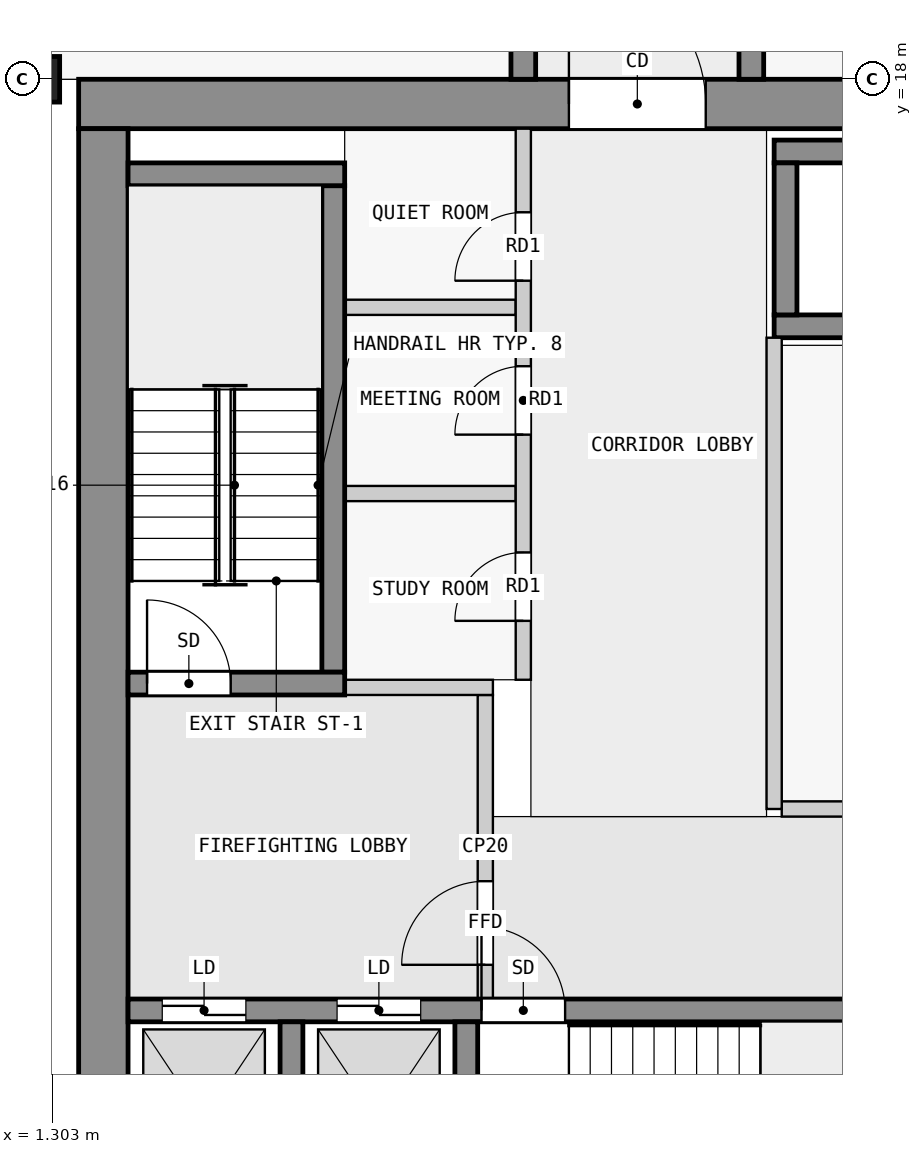
"""IFC4 building model, lengths in metres.
Left out: names, types, materials, properties, quantities, classifications, styles, units other than length and angle.
Written with IfcOpenShell. Run it as: python <this file> out.ifc"""

import sys

from ifc_helpers import new_model, si_unit, direction, frame, frame_2d, origin, origin_2d, place, context, subcontext, project, spatial, rectangle, extrude, element, fill, save


model = new_model("IFC4")
c1 = context("Model", 3, precision=1e-05, world=origin(), true_north=direction((0.0, 1.0)))
c2 = subcontext(c1, "Body", "Model", "MODEL_VIEW")
j1 = project(units=[si_unit("LENGTHUNIT", "METRE"), si_unit("PLANEANGLEUNIT", "RADIAN")], contexts=[c1])
p1 = place(None, origin())
s1 = spatial("IfcSite", under=j1, at=p1, CompositionType="ELEMENT")
p2 = place(p1, origin())
s2 = spatial("IfcBuilding", under=s1, at=p2, CompositionType="ELEMENT")
p3 = place(p2, frame((0.0, 0.0, 106.3)))
s3 = spatial("IfcBuildingStorey", under=s2, at=p3, CompositionType="ELEMENT", Elevation=106.3)
p4 = place(p3, frame((0.7, 18.0, 0.0), z_axis=(0.0, 0.0, 1.0), x_axis=(0.0, 1.0, 0.0)))
e1 = element("IfcColumn", 1, at=p4, inside=s3, PredefinedType="COLUMN", context=c2, shape_type="SweptSolid", body=[
    extrude(rectangle(XDim=0.6, YDim=1.4, at=origin_2d()), origin(), (0.0, 0.0, 1.0), 3.5),
])
p5 = place(p3, frame((1.65, 17.675, 0.0), z_axis=(0.0, 0.0, 1.0), x_axis=(1.0, 0.0, 0.0)))
e2 = element("IfcWall", 2, at=p5, inside=s3, PredefinedType="SHEAR", context=c2, shape_type="SweptSolid", body=[
    extrude(rectangle(XDim=20.85, YDim=0.65, at=frame_2d((10.425, 0.0))), origin(), (0.0, 0.0, 1.0), 3.25),
])
p6 = place(p5, frame((6.45, 0.0, 0.0)))
e3 = element("IfcOpeningElement", 3, at=p6, cuts=e2, PredefinedType="OPENING", context=c2, shape_type="SweptSolid", body=[
    extrude(rectangle(XDim=1.8, YDim=2.1, at=frame_2d((0.9, 1.05))), frame((0.0, 0.335, 0.0), z_axis=(0.0, -1.0, 0.0), x_axis=(1.0, 0.0, 0.0)), (0.0, 0.0, 1.0), 0.67),
])
p7 = place(p3, frame((1.975, 2.5, 0.0), z_axis=(0.0, 0.0, 1.0), x_axis=(0.0, 1.0, 0.0)))
e4 = element("IfcWall", 4, at=p7, inside=s3, PredefinedType="SHEAR", context=c2, shape_type="SweptSolid", body=[
    extrude(rectangle(XDim=14.85, YDim=0.65, at=frame_2d((7.425, 0.0))), origin(), (0.0, 0.0, 1.0), 3.25),
])
for number, where, z_axis, x_axis in (
    (5, (4.45, 2.8, 0.0), (0.0, 0.0, 1.0), (0.0, 1.0, 0.0)),
    (6, (6.75, 2.8, 0.0), (0.0, 0.0, 1.0), (0.0, 1.0, 0.0)),
):
    element("IfcWall", number, at=place(p3, frame(where, z_axis=z_axis, x_axis=x_axis)), inside=s3, PredefinedType="SHEAR", context=c2, shape_type="SweptSolid", body=[
        extrude(rectangle(XDim=2.8, YDim=0.3, at=frame_2d((1.4, 0.0))), origin(), (0.0, 0.0, 1.0), 3.25),
    ])
p8 = place(p3, frame((2.3, 5.75, 0.0), z_axis=(0.0, 0.0, 1.0), x_axis=(1.0, 0.0, 0.0)))
e7 = element("IfcWall", 7, at=p8, inside=s3, PredefinedType="SHEAR", context=c2, shape_type="SweptSolid", body=[
    extrude(rectangle(XDim=18.8, YDim=0.3, at=frame_2d((9.4, 0.0))), origin(), (0.0, 0.0, 1.0), 3.25),
])
p9 = place(p8, frame((4.65, 0.0, 0.0)))
e8 = element("IfcOpeningElement", 8, at=p9, cuts=e7, PredefinedType="OPENING", context=c2, shape_type="SweptSolid", body=[
    extrude(rectangle(XDim=1.1, YDim=2.1, at=frame_2d((0.55, 1.05))), frame((0.0, 0.16, 0.0), z_axis=(0.0, -1.0, 0.0), x_axis=(1.0, 0.0, 0.0)), (0.0, 0.0, 1.0), 0.32),
])
p10 = place(p8, frame((0.45, 0.0, 0.0)))
e9 = element("IfcOpeningElement", 9, at=p10, cuts=e7, PredefinedType="OPENING", context=c2, shape_type="SweptSolid", body=[
    extrude(rectangle(XDim=1.1, YDim=2.1, at=frame_2d((0.55, 1.05))), frame((0.0, 0.16, 0.0), z_axis=(0.0, -1.0, 0.0), x_axis=(1.0, 0.0, 0.0)), (0.0, 0.0, 1.0), 0.32),
])
p11 = place(p8, frame((2.75, 0.0, 0.0)))
e10 = element("IfcOpeningElement", 10, at=p11, cuts=e7, PredefinedType="OPENING", context=c2, shape_type="SweptSolid", body=[
    extrude(rectangle(XDim=1.1, YDim=2.1, at=frame_2d((0.55, 1.05))), frame((0.0, 0.16, 0.0), z_axis=(0.0, -1.0, 0.0), x_axis=(1.0, 0.0, 0.0)), (0.0, 0.0, 1.0), 0.32),
])
p12 = place(p8, frame((11.85, 0.0, 0.0)))
e11 = element("IfcOpeningElement", 11, at=p12, cuts=e7, PredefinedType="OPENING", context=c2, shape_type="SweptSolid", body=[
    extrude(rectangle(XDim=1.1, YDim=2.1, at=frame_2d((0.55, 1.05))), frame((0.0, 0.16, 0.0), z_axis=(0.0, -1.0, 0.0), x_axis=(1.0, 0.0, 0.0)), (0.0, 0.0, 1.0), 0.32),
])
p13 = place(p8, frame((14.35, 0.0, 0.0)))
e12 = element("IfcOpeningElement", 12, at=p13, cuts=e7, PredefinedType="OPENING", context=c2, shape_type="SweptSolid", body=[
    extrude(rectangle(XDim=1.1, YDim=2.1, at=frame_2d((0.55, 1.05))), frame((0.0, 0.16, 0.0), z_axis=(0.0, -1.0, 0.0), x_axis=(1.0, 0.0, 0.0)), (0.0, 0.0, 1.0), 0.32),
])
p14 = place(p8, frame((16.85, 0.0, 0.0)))
e13 = element("IfcOpeningElement", 13, at=p14, cuts=e7, PredefinedType="OPENING", context=c2, shape_type="SweptSolid", body=[
    extrude(rectangle(XDim=1.1, YDim=2.1, at=frame_2d((0.55, 1.05))), frame((0.0, 0.16, 0.0), z_axis=(0.0, -1.0, 0.0), x_axis=(1.0, 0.0, 0.0)), (0.0, 0.0, 1.0), 0.32),
])
p15 = place(p3, frame((2.3, 10.05, 0.0), z_axis=(0.0, 0.0, 1.0), x_axis=(1.0, 0.0, 0.0)))
e14 = element("IfcWall", 14, at=p15, inside=s3, PredefinedType="SHEAR", context=c2, shape_type="SweptSolid", body=[
    extrude(rectangle(XDim=2.85, YDim=0.3, at=frame_2d((1.425, 0.0))), origin(), (0.0, 0.0, 1.0), 3.25),
])
p16 = place(p15, frame((0.25, 0.0, 0.0)))
e15 = element("IfcOpeningElement", 15, at=p16, cuts=e14, PredefinedType="OPENING", context=c2, shape_type="SweptSolid", body=[
    extrude(rectangle(XDim=1.1, YDim=2.1, at=frame_2d((0.55, 1.05))), frame((0.0, 0.16, 0.0), z_axis=(0.0, -1.0, 0.0), x_axis=(1.0, 0.0, 0.0)), (0.0, 0.0, 1.0), 0.32),
])
p17 = place(p3, frame((5.0, 10.2, 0.0), z_axis=(0.0, 0.0, 1.0), x_axis=(0.0, 1.0, 0.0)))
e16 = element("IfcWall", 16, at=p17, inside=s3, PredefinedType="SHEAR", context=c2, shape_type="SweptSolid", body=[
    extrude(rectangle(XDim=6.4, YDim=0.3, at=frame_2d((3.2, 0.0))), origin(), (0.0, 0.0, 1.0), 3.25),
])
p18 = place(p3, frame((2.3, 16.75, 0.0), z_axis=(0.0, 0.0, 1.0), x_axis=(1.0, 0.0, 0.0)))
e17 = element("IfcWall", 17, at=p18, inside=s3, PredefinedType="SHEAR", context=c2, shape_type="SweptSolid", body=[
    extrude(rectangle(XDim=2.85, YDim=0.3, at=frame_2d((1.425, 0.0))), origin(), (0.0, 0.0, 1.0), 3.25),
])
for number, where, z_axis, x_axis in (
    (18, (10.8, 17.05, 0.0), (0.0, 0.0, 1.0), (1.0, 0.0, 0.0)),
    (19, (10.8, 14.75, 0.0), (0.0, 0.0, 1.0), (1.0, 0.0, 0.0)),
):
    element("IfcWall", number, at=place(p3, frame(where, z_axis=z_axis, x_axis=x_axis)), inside=s3, PredefinedType="SHEAR", context=c2, shape_type="SweptSolid", body=[
        extrude(rectangle(XDim=7.8, YDim=0.3, at=frame_2d((3.9, 0.0))), origin(), (0.0, 0.0, 1.0), 3.25),
    ])
p19 = place(p3, frame((10.95, 14.9, 0.0), z_axis=(0.0, 0.0, 1.0), x_axis=(0.0, 1.0, 0.0)))
e20 = element("IfcWall", 20, at=p19, inside=s3, PredefinedType="SHEAR", context=c2, shape_type="SweptSolid", body=[
    extrude(rectangle(XDim=2.0, YDim=0.3, at=frame_2d((1.0, 0.0))), origin(), (0.0, 0.0, 1.0), 3.25),
])
p20 = place(p3, frame((7.5, 18.0, 0.0), z_axis=(0.0, 0.0, 1.0), x_axis=(0.0, 1.0, 0.0)))
e21 = element("IfcWall", 21, at=p20, inside=s3, PredefinedType="SHEAR", context=c2, shape_type="SweptSolid", body=[
    extrude(rectangle(XDim=27.0, YDim=0.325, at=frame_2d((13.5, 0.0))), origin(), (0.0, 0.0, 1.0), 3.25),
])
p21 = place(p20, frame((1.75, 0.0, 0.0)))
e22 = element("IfcOpeningElement", 22, at=p21, cuts=e21, PredefinedType="OPENING", context=c2, shape_type="SweptSolid", body=[
    extrude(rectangle(XDim=1.0, YDim=2.1, at=frame_2d((0.5, 1.05))), frame((0.0, 0.172, 0.0), z_axis=(0.0, -1.0, 0.0), x_axis=(1.0, 0.0, 0.0)), (0.0, 0.0, 1.0), 0.345),
])
p22 = place(p20, frame((6.25, 0.0, 0.0)))
e23 = element("IfcOpeningElement", 23, at=p22, cuts=e21, PredefinedType="OPENING", context=c2, shape_type="SweptSolid", body=[
    extrude(rectangle(XDim=1.0, YDim=2.1, at=frame_2d((0.5, 1.05))), frame((0.0, 0.172, 0.0), z_axis=(0.0, -1.0, 0.0), x_axis=(1.0, 0.0, 0.0)), (0.0, 0.0, 1.0), 0.345),
])
p23 = place(p20, frame((10.75, 0.0, 0.0)))
e24 = element("IfcOpeningElement", 24, at=p23, cuts=e21, PredefinedType="OPENING", context=c2, shape_type="SweptSolid", body=[
    extrude(rectangle(XDim=1.0, YDim=2.1, at=frame_2d((0.5, 1.05))), frame((0.0, 0.172, 0.0), z_axis=(0.0, -1.0, 0.0), x_axis=(1.0, 0.0, 0.0)), (0.0, 0.0, 1.0), 0.345),
])
p24 = place(p20, frame((15.25, 0.0, 0.0)))
e25 = element("IfcOpeningElement", 25, at=p24, cuts=e21, PredefinedType="OPENING", context=c2, shape_type="SweptSolid", body=[
    extrude(rectangle(XDim=1.0, YDim=2.1, at=frame_2d((0.5, 1.05))), frame((0.0, 0.172, 0.0), z_axis=(0.0, -1.0, 0.0), x_axis=(1.0, 0.0, 0.0)), (0.0, 0.0, 1.0), 0.345),
])
p25 = place(p20, frame((19.75, 0.0, 0.0)))
e26 = element("IfcOpeningElement", 26, at=p25, cuts=e21, PredefinedType="OPENING", context=c2, shape_type="SweptSolid", body=[
    extrude(rectangle(XDim=1.0, YDim=2.1, at=frame_2d((0.5, 1.05))), frame((0.0, 0.172, 0.0), z_axis=(0.0, -1.0, 0.0), x_axis=(1.0, 0.0, 0.0)), (0.0, 0.0, 1.0), 0.345),
])
p26 = place(p20, frame((23.25, 0.0, 0.0)))
e27 = element("IfcOpeningElement", 27, at=p26, cuts=e21, PredefinedType="OPENING", context=c2, shape_type="SweptSolid", body=[
    extrude(rectangle(XDim=0.9, YDim=2.1, at=frame_2d((0.45, 1.05))), frame((0.0, 0.172, 0.0), z_axis=(0.0, -1.0, 0.0), x_axis=(1.0, 0.0, 0.0)), (0.0, 0.0, 1.0), 0.345),
])
p27 = place(p20, frame((25.45, 0.0, 0.0)))
e28 = element("IfcOpeningElement", 28, at=p27, cuts=e21, PredefinedType="OPENING", context=c2, shape_type="SweptSolid", body=[
    extrude(rectangle(XDim=1.0, YDim=2.1, at=frame_2d((0.5, 1.05))), frame((0.0, 0.172, 0.0), z_axis=(0.0, -1.0, 0.0), x_axis=(1.0, 0.0, 0.0)), (0.0, 0.0, 1.0), 0.345),
])
p28 = place(p3, frame((10.5, 18.0, 0.0), z_axis=(0.0, 0.0, 1.0), x_axis=(0.0, 1.0, 0.0)))
e29 = element("IfcWall", 29, at=p28, inside=s3, PredefinedType="SHEAR", context=c2, shape_type="SweptSolid", body=[
    extrude(rectangle(XDim=27.0, YDim=0.325, at=frame_2d((13.5, 0.0))), origin(), (0.0, 0.0, 1.0), 3.25),
])
p29 = place(p28, frame((1.75, 0.0, 0.0)))
e30 = element("IfcOpeningElement", 30, at=p29, cuts=e29, PredefinedType="OPENING", context=c2, shape_type="SweptSolid", body=[
    extrude(rectangle(XDim=1.0, YDim=2.1, at=frame_2d((0.5, 1.05))), frame((0.0, 0.172, 0.0), z_axis=(0.0, -1.0, 0.0), x_axis=(1.0, 0.0, 0.0)), (0.0, 0.0, 1.0), 0.345),
])
p30 = place(p28, frame((6.25, 0.0, 0.0)))
e31 = element("IfcOpeningElement", 31, at=p30, cuts=e29, PredefinedType="OPENING", context=c2, shape_type="SweptSolid", body=[
    extrude(rectangle(XDim=1.0, YDim=2.1, at=frame_2d((0.5, 1.05))), frame((0.0, 0.172, 0.0), z_axis=(0.0, -1.0, 0.0), x_axis=(1.0, 0.0, 0.0)), (0.0, 0.0, 1.0), 0.345),
])
p31 = place(p28, frame((13.05, 0.0, 0.0)))
e32 = element("IfcOpeningElement", 32, at=p31, cuts=e29, PredefinedType="OPENING", context=c2, shape_type="SweptSolid", body=[
    extrude(rectangle(XDim=1.0, YDim=2.1, at=frame_2d((0.5, 1.05))), frame((0.0, 0.172, 0.0), z_axis=(0.0, -1.0, 0.0), x_axis=(1.0, 0.0, 0.0)), (0.0, 0.0, 1.0), 0.345),
])
p32 = place(p28, frame((21.35, 0.0, 0.0)))
e33 = element("IfcOpeningElement", 33, at=p32, cuts=e29, PredefinedType="OPENING", context=c2, shape_type="SweptSolid", body=[
    extrude(rectangle(XDim=1.0, YDim=2.1, at=frame_2d((0.5, 1.05))), frame((0.0, 0.172, 0.0), z_axis=(0.0, -1.0, 0.0), x_axis=(1.0, 0.0, 0.0)), (0.0, 0.0, 1.0), 0.345),
])
p33 = place(p3, frame((7.0, 5.9, 0.0), z_axis=(0.0, 0.0, 1.0), x_axis=(0.0, 1.0, 0.0)))
e34 = element("IfcWall", 34, at=p33, inside=s3, PredefinedType="PARTITIONING", context=c2, shape_type="SweptSolid", body=[
    extrude(rectangle(XDim=4.0, YDim=0.2, at=frame_2d((2.0, 0.0))), origin(), (0.0, 0.0, 1.0), 3.25),
])
p34 = place(p33, frame((0.45, 0.0, 0.0)))
e35 = element("IfcOpeningElement", 35, at=p34, cuts=e34, PredefinedType="OPENING", context=c2, shape_type="SweptSolid", body=[
    extrude(rectangle(XDim=1.1, YDim=2.1, at=frame_2d((0.55, 1.05))), frame((0.0, 0.11, 0.0), z_axis=(0.0, -1.0, 0.0), x_axis=(1.0, 0.0, 0.0)), (0.0, 0.0, 1.0), 0.22),
])
p35 = place(p3, frame((5.15, 10.0, 0.0), z_axis=(0.0, 0.0, 1.0), x_axis=(1.0, 0.0, 0.0)))
e36 = element("IfcWall", 36, at=p35, inside=s3, PredefinedType="PARTITIONING", context=c2, shape_type="SweptSolid", body=[
    extrude(rectangle(XDim=1.95, YDim=0.2, at=frame_2d((0.975, 0.0))), origin(), (0.0, 0.0, 1.0), 3.25),
])
p36 = place(p3, frame((10.8, 8.4, 0.0), z_axis=(0.0, 0.0, 1.0), x_axis=(0.0, 1.0, 0.0)))
e37 = element("IfcWall", 37, at=p36, inside=s3, PredefinedType="PARTITIONING", context=c2, shape_type="SweptSolid", body=[
    extrude(rectangle(XDim=6.2, YDim=0.2, at=frame_2d((3.1, 0.0))), origin(), (0.0, 0.0, 1.0), 3.25),
])
p37 = place(p3, frame((10.9, 8.4, 0.0), z_axis=(0.0, 0.0, 1.0), x_axis=(1.0, 0.0, 0.0)))
e38 = element("IfcWall", 38, at=p37, inside=s3, PredefinedType="PARTITIONING", context=c2, shape_type="SweptSolid", body=[
    extrude(rectangle(XDim=7.4, YDim=0.2, at=frame_2d((3.7, 0.0))), origin(), (0.0, 0.0, 1.0), 3.25),
])
p38 = place(p3, frame((7.5, 10.1, 0.0), z_axis=(0.0, 0.0, 1.0), x_axis=(0.0, 1.0, 0.0)))
e39 = element("IfcWall", 39, at=p38, inside=s3, PredefinedType="PARTITIONING", context=c2, shape_type="SweptSolid", body=[
    extrude(rectangle(XDim=7.25, YDim=0.2, at=frame_2d((3.625, 0.0))), origin(), (0.0, 0.0, 1.0), 3.25),
])
p39 = place(p38, frame((0.775, 0.0, 0.0)))
e40 = element("IfcOpeningElement", 40, at=p39, cuts=e39, PredefinedType="OPENING", context=c2, shape_type="SweptSolid", body=[
    extrude(rectangle(XDim=0.9, YDim=2.1, at=frame_2d((0.45, 1.05))), frame((0.0, 0.11, 0.0), z_axis=(0.0, -1.0, 0.0), x_axis=(1.0, 0.0, 0.0)), (0.0, 0.0, 1.0), 0.22),
])
p40 = place(p38, frame((3.225, 0.0, 0.0)))
e41 = element("IfcOpeningElement", 41, at=p40, cuts=e39, PredefinedType="OPENING", context=c2, shape_type="SweptSolid", body=[
    extrude(rectangle(XDim=0.9, YDim=2.1, at=frame_2d((0.45, 1.05))), frame((0.0, 0.11, 0.0), z_axis=(0.0, -1.0, 0.0), x_axis=(1.0, 0.0, 0.0)), (0.0, 0.0, 1.0), 0.22),
])
p41 = place(p38, frame((5.25, 0.0, 0.0)))
e42 = element("IfcOpeningElement", 42, at=p41, cuts=e39, PredefinedType="OPENING", context=c2, shape_type="SweptSolid", body=[
    extrude(rectangle(XDim=0.9, YDim=2.1, at=frame_2d((0.45, 1.05))), frame((0.0, 0.11, 0.0), z_axis=(0.0, -1.0, 0.0), x_axis=(1.0, 0.0, 0.0)), (0.0, 0.0, 1.0), 0.22),
])
for number, where, z_axis, x_axis in (
    (43, (5.15, 12.55, 0.0), (0.0, 0.0, 1.0), (1.0, 0.0, 0.0)),
    (44, (5.15, 15.0, 0.0), (0.0, 0.0, 1.0), (1.0, 0.0, 0.0)),
):
    element("IfcWall", number, at=place(p3, frame(where, z_axis=z_axis, x_axis=x_axis)), inside=s3, PredefinedType="PARTITIONING", context=c2, shape_type="SweptSolid", body=[
        extrude(rectangle(XDim=2.25, YDim=0.2, at=frame_2d((1.125, 0.0))), origin(), (0.0, 0.0, 1.0), 3.25),
    ])
p42 = place(p34, origin())
e45 = element("IfcDoor", 45, at=p42, inside=s3, OperationType="SINGLE_SWING_LEFT", PredefinedType="DOOR", context=c2, shape_type="SweptSolid", body=[
    extrude(rectangle(XDim=1.1, YDim=2.1, at=frame_2d((0.55, 1.05))), frame((0.0, 0.025, 0.0), z_axis=(0.0, -1.0, 0.0), x_axis=(1.0, 0.0, 0.0)), (0.0, 0.0, 1.0), 0.05),
])
fill(e35, e45)
p43 = place(p16, origin())
e46 = element("IfcDoor", 46, at=p43, inside=s3, OperationType="SINGLE_SWING_RIGHT", PredefinedType="DOOR", context=c2, shape_type="SweptSolid", body=[
    extrude(rectangle(XDim=1.1, YDim=2.1, at=frame_2d((0.55, 1.05))), frame((0.0, 0.025, 0.0), z_axis=(0.0, -1.0, 0.0), x_axis=(1.0, 0.0, 0.0)), (0.0, 0.0, 1.0), 0.05),
])
fill(e15, e46)
p44 = place(p9, origin())
e47 = element("IfcDoor", 47, at=p44, inside=s3, OperationType="SINGLE_SWING_LEFT", PredefinedType="DOOR", context=c2, shape_type="SweptSolid", body=[
    extrude(rectangle(XDim=1.1, YDim=2.1, at=frame_2d((0.55, 1.05))), frame((0.0, 0.025, 0.0), z_axis=(0.0, -1.0, 0.0), x_axis=(1.0, 0.0, 0.0)), (0.0, 0.0, 1.0), 0.05),
])
fill(e8, e47)
p45 = place(p10, origin())
e48 = element("IfcDoor", 48, at=p45, inside=s3, OperationType="DOUBLE_DOOR_SLIDING", PredefinedType="DOOR", context=c2, shape_type="SweptSolid", body=[
    extrude(rectangle(XDim=1.1, YDim=2.1, at=frame_2d((0.55, 1.05))), frame((0.0, 0.025, 0.0), z_axis=(0.0, -1.0, 0.0), x_axis=(1.0, 0.0, 0.0)), (0.0, 0.0, 1.0), 0.05),
])
fill(e9, e48)
p46 = place(p11, origin())
e49 = element("IfcDoor", 49, at=p46, inside=s3, OperationType="DOUBLE_DOOR_SLIDING", PredefinedType="DOOR", context=c2, shape_type="SweptSolid", body=[
    extrude(rectangle(XDim=1.1, YDim=2.1, at=frame_2d((0.55, 1.05))), frame((0.0, 0.025, 0.0), z_axis=(0.0, -1.0, 0.0), x_axis=(1.0, 0.0, 0.0)), (0.0, 0.0, 1.0), 0.05),
])
fill(e10, e49)
p47 = place(p6, origin())
e50 = element("IfcDoor", 50, at=p47, inside=s3, OperationType="DOUBLE_DOOR_SINGLE_SWING", PredefinedType="DOOR", context=c2, shape_type="SweptSolid", body=[
    extrude(rectangle(XDim=1.8, YDim=2.1, at=frame_2d((0.9, 1.05))), frame((0.0, 0.025, 0.0), z_axis=(0.0, -1.0, 0.0), x_axis=(1.0, 0.0, 0.0)), (0.0, 0.0, 1.0), 0.05),
])
fill(e3, e50)
p48 = place(p39, origin())
e51 = element("IfcDoor", 51, at=p48, inside=s3, OperationType="SINGLE_SWING_RIGHT", PredefinedType="DOOR", context=c2, shape_type="SweptSolid", body=[
    extrude(rectangle(XDim=0.9, YDim=2.1, at=frame_2d((0.45, 1.05))), frame((0.0, 0.025, 0.0), z_axis=(0.0, -1.0, 0.0), x_axis=(1.0, 0.0, 0.0)), (0.0, 0.0, 1.0), 0.05),
])
fill(e40, e51)
p49 = place(p40, origin())
e52 = element("IfcDoor", 52, at=p49, inside=s3, OperationType="SINGLE_SWING_RIGHT", PredefinedType="DOOR", context=c2, shape_type="SweptSolid", body=[
    extrude(rectangle(XDim=0.9, YDim=2.1, at=frame_2d((0.45, 1.05))), frame((0.0, 0.025, 0.0), z_axis=(0.0, -1.0, 0.0), x_axis=(1.0, 0.0, 0.0)), (0.0, 0.0, 1.0), 0.05),
])
fill(e41, e52)
p50 = place(p41, origin())
e53 = element("IfcDoor", 53, at=p50, inside=s3, OperationType="SINGLE_SWING_RIGHT", PredefinedType="DOOR", context=c2, shape_type="SweptSolid", body=[
    extrude(rectangle(XDim=0.9, YDim=2.1, at=frame_2d((0.45, 1.05))), frame((0.0, 0.025, 0.0), z_axis=(0.0, -1.0, 0.0), x_axis=(1.0, 0.0, 0.0)), (0.0, 0.0, 1.0), 0.05),
])
fill(e42, e53)
save(model, sys.argv[1])
